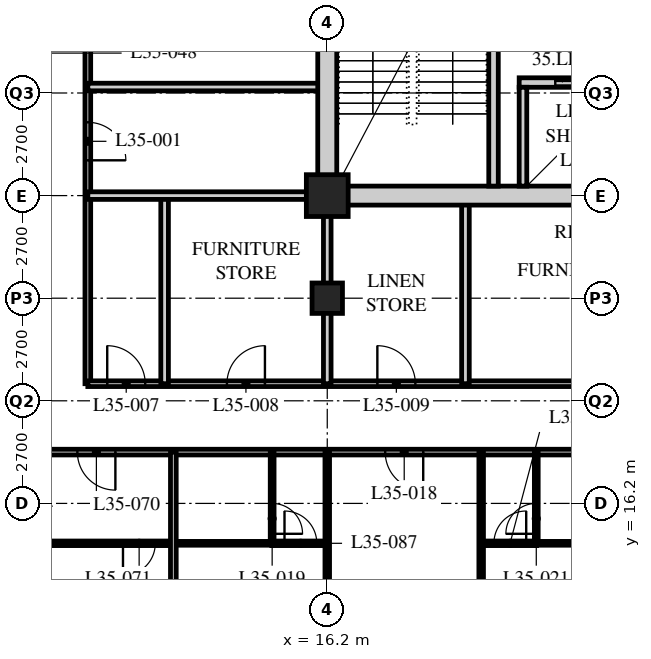
"""IFC4 building model, lengths in metres.
Left out: names, types, materials, properties, quantities, classifications, styles, units other than length and angle.
Written with IfcOpenShell. Run it as: python <this file> out.ifc"""

import sys

from ifc_helpers import new_model, si_unit, direction, frame, frame_2d, origin, origin_2d, place, context, subcontext, project, spatial, rectangle, hollow_rectangle, extrude, element, fill, save


model = new_model("IFC4")
c1 = context("Model", 3, precision=1e-05, world=origin(), true_north=direction((0.0, 1.0)))
c2 = subcontext(c1, "Body", "Model", "MODEL_VIEW")
j1 = project(units=[si_unit("LENGTHUNIT", "METRE"), si_unit("PLANEANGLEUNIT", "RADIAN")], contexts=[c1])
p1 = place(None, origin())
s1 = spatial("IfcSite", under=j1, at=p1, CompositionType="ELEMENT")
p2 = place(p1, origin())
s2 = spatial("IfcBuilding", under=s1, at=p2, CompositionType="ELEMENT")
p3 = place(p2, frame((0.0, 0.0, 137.4)))
s3 = spatial("IfcBuildingStorey", under=s2, at=p3, CompositionType="ELEMENT", Elevation=137.4)
p4 = place(p3, frame((16.2, 21.6, 0.0), z_axis=(0.0, 0.0, 1.0), x_axis=(1.0, 0.0, 0.0)))
e1 = element("IfcColumn", 1, at=p4, inside=s3, PredefinedType="COLUMN", context=c2, shape_type="SweptSolid", body=[
    extrude(hollow_rectangle(XDim=0.8, YDim=0.8, WallThickness=0.08, at=origin_2d()), origin(), (0.0, 0.0, 1.0), 3.4),
])
p5 = place(p3, frame((16.2, 24.3, 0.0), z_axis=(0.0, 0.0, 1.0), x_axis=(1.0, 0.0, 0.0)))
e2 = element("IfcColumn", 2, at=p5, inside=s3, PredefinedType="COLUMN", context=c2, shape_type="SweptSolid", body=[
    extrude(hollow_rectangle(XDim=1.1, YDim=1.1, WallThickness=0.1, at=origin_2d()), origin(), (0.0, 0.0, 1.0), 3.4),
])
p6 = place(p3, frame((8.1, 17.55, 0.0), z_axis=(0.0, 0.0, 1.0), x_axis=(1.0, 0.0, 0.0)))
e3 = element("IfcWall", 3, at=p6, inside=s3, PredefinedType="PARTITIONING", context=c2, shape_type="SweptSolid", body=[
    extrude(rectangle(XDim=36.45, YDim=0.15, at=frame_2d((18.225, 0.0))), origin(), (0.0, 0.0, 1.0), 3.19),
])
p7 = place(p6, frame((9.625, 0.0, 0.0)))
e4 = element("IfcOpeningElement", 4, at=p7, cuts=e3, PredefinedType="OPENING", context=c2, shape_type="SweptSolid", body=[
    extrude(rectangle(XDim=1.0, YDim=2.1, at=frame_2d((0.5, 1.05))), frame((0.0, 0.085, 0.0), z_axis=(0.0, -1.0, 0.0), x_axis=(1.0, 0.0, 0.0)), (0.0, 0.0, 1.0), 0.17),
])
p8 = place(p6, frame((18.1, 0.0, 0.0)))
e5 = element("IfcOpeningElement", 5, at=p8, cuts=e3, PredefinedType="OPENING", context=c2, shape_type="SweptSolid", body=[
    extrude(rectangle(XDim=1.0, YDim=2.1, at=frame_2d((0.5, 1.05))), frame((0.0, 0.085, 0.0), z_axis=(0.0, -1.0, 0.0), x_axis=(1.0, 0.0, 0.0)), (0.0, 0.0, 1.0), 0.17),
])
p9 = place(p6, frame((26.75, 0.0, 0.0)))
e6 = element("IfcOpeningElement", 6, at=p9, cuts=e3, PredefinedType="OPENING", context=c2, shape_type="SweptSolid", body=[
    extrude(rectangle(XDim=1.0, YDim=2.1, at=frame_2d((0.5, 1.05))), frame((0.0, 0.085, 0.0), z_axis=(0.0, -1.0, 0.0), x_axis=(1.0, 0.0, 0.0)), (0.0, 0.0, 1.0), 0.17),
])
p10 = place(p6, frame((30.8, 0.0, 0.0)))
e7 = element("IfcOpeningElement", 7, at=p10, cuts=e3, PredefinedType="OPENING", context=c2, shape_type="SweptSolid", body=[
    extrude(rectangle(XDim=1.0, YDim=2.1, at=frame_2d((0.5, 1.05))), frame((0.0, 0.085, 0.0), z_axis=(0.0, -1.0, 0.0), x_axis=(1.0, 0.0, 0.0)), (0.0, 0.0, 1.0), 0.17),
])
p11 = place(p6, frame((1.525, 0.0, 0.0)))
e8 = element("IfcOpeningElement", 8, at=p11, cuts=e3, PredefinedType="OPENING", context=c2, shape_type="SweptSolid", body=[
    extrude(rectangle(XDim=1.0, YDim=2.1, at=frame_2d((0.5, 1.05))), frame((0.0, 0.085, 0.0), z_axis=(0.0, -1.0, 0.0), x_axis=(1.0, 0.0, 0.0)), (0.0, 0.0, 1.0), 0.17),
])
p12 = place(p6, frame((33.925, 0.0, 0.0)))
e9 = element("IfcOpeningElement", 9, at=p12, cuts=e3, PredefinedType="OPENING", context=c2, shape_type="SweptSolid", body=[
    extrude(rectangle(XDim=1.0, YDim=2.1, at=frame_2d((0.5, 1.05))), frame((0.0, 0.085, 0.0), z_axis=(0.0, -1.0, 0.0), x_axis=(1.0, 0.0, 0.0)), (0.0, 0.0, 1.0), 0.17),
])
p13 = place(p3, frame((9.9, 44.1, 0.0), z_axis=(0.0, 0.0, 1.0), x_axis=(0.0, -1.0, 0.0)))
e10 = element("IfcWall", 10, at=p13, inside=s3, PredefinedType="PARTITIONING", context=c2, shape_type="SweptSolid", body=[
    extrude(rectangle(XDim=24.75, YDim=0.15, at=frame_2d((12.375, 0.0))), origin(), (0.0, 0.0, 1.0), 3.19),
])
p14 = place(p13, frame((17.871, 0.0, 0.0)))
e11 = element("IfcOpeningElement", 11, at=p14, cuts=e10, PredefinedType="OPENING", context=c2, shape_type="SweptSolid", body=[
    extrude(rectangle(XDim=1.0, YDim=2.1, at=frame_2d((0.5, 1.05))), frame((0.0, 0.085, 0.0), z_axis=(0.0, -1.0, 0.0), x_axis=(1.0, 0.0, 0.0)), (0.0, 0.0, 1.0), 0.17),
])
p15 = place(p13, frame((13.821, 0.0, 0.0)))
e12 = element("IfcOpeningElement", 12, at=p15, cuts=e10, PredefinedType="OPENING", context=c2, shape_type="SweptSolid", body=[
    extrude(rectangle(XDim=1.0, YDim=2.1, at=frame_2d((0.5, 1.05))), frame((0.0, 0.085, 0.0), z_axis=(0.0, -1.0, 0.0), x_axis=(1.0, 0.0, 0.0)), (0.0, 0.0, 1.0), 0.17),
])
p16 = place(p13, frame((10.4, 0.0, 0.0)))
e13 = element("IfcOpeningElement", 13, at=p16, cuts=e10, PredefinedType="OPENING", context=c2, shape_type="SweptSolid", body=[
    extrude(rectangle(XDim=1.0, YDim=2.1, at=frame_2d((0.5, 1.05))), frame((0.0, 0.085, 0.0), z_axis=(0.0, -1.0, 0.0), x_axis=(1.0, 0.0, 0.0)), (0.0, 0.0, 1.0), 0.17),
])
p17 = place(p13, frame((6.35, 0.0, 0.0)))
e14 = element("IfcOpeningElement", 14, at=p17, cuts=e10, PredefinedType="OPENING", context=c2, shape_type="SweptSolid", body=[
    extrude(rectangle(XDim=1.0, YDim=2.1, at=frame_2d((0.5, 1.05))), frame((0.0, 0.085, 0.0), z_axis=(0.0, -1.0, 0.0), x_axis=(1.0, 0.0, 0.0)), (0.0, 0.0, 1.0), 0.17),
])
p18 = place(p3, frame((9.9, 19.35, 0.0), z_axis=(0.0, 0.0, 1.0), x_axis=(1.0, 0.0, 0.0)))
e15 = element("IfcWall", 15, at=p18, inside=s3, PredefinedType="PARTITIONING", context=c2, shape_type="SweptSolid", body=[
    extrude(rectangle(XDim=17.24, YDim=0.15, at=frame_2d((8.62, 0.0))), origin(), (0.0, 0.0, 1.0), 3.19),
])
p19 = place(p18, frame((0.51, 0.0, 0.0)))
e16 = element("IfcOpeningElement", 16, at=p19, cuts=e15, PredefinedType="OPENING", context=c2, shape_type="SweptSolid", body=[
    extrude(rectangle(XDim=1.0, YDim=2.1, at=frame_2d((0.5, 1.05))), frame((0.0, 0.085, 0.0), z_axis=(0.0, -1.0, 0.0), x_axis=(1.0, 0.0, 0.0)), (0.0, 0.0, 1.0), 0.17),
])
p20 = place(p18, frame((3.66, 0.0, 0.0)))
e17 = element("IfcOpeningElement", 17, at=p20, cuts=e15, PredefinedType="OPENING", context=c2, shape_type="SweptSolid", body=[
    extrude(rectangle(XDim=1.0, YDim=2.1, at=frame_2d((0.5, 1.05))), frame((0.0, 0.085, 0.0), z_axis=(0.0, -1.0, 0.0), x_axis=(1.0, 0.0, 0.0)), (0.0, 0.0, 1.0), 0.17),
])
p21 = place(p18, frame((7.618, 0.0, 0.0)))
e18 = element("IfcOpeningElement", 18, at=p21, cuts=e15, PredefinedType="OPENING", context=c2, shape_type="SweptSolid", body=[
    extrude(rectangle(XDim=1.0, YDim=2.1, at=frame_2d((0.5, 1.05))), frame((0.0, 0.085, 0.0), z_axis=(0.0, -1.0, 0.0), x_axis=(1.0, 0.0, 0.0)), (0.0, 0.0, 1.0), 0.17),
])
p22 = place(p18, frame((13.093, 0.0, 0.0)))
e19 = element("IfcOpeningElement", 19, at=p22, cuts=e15, PredefinedType="OPENING", context=c2, shape_type="SweptSolid", body=[
    extrude(rectangle(XDim=1.0, YDim=2.1, at=frame_2d((0.5, 1.05))), frame((0.0, 0.085, 0.0), z_axis=(0.0, -1.0, 0.0), x_axis=(1.0, 0.0, 0.0)), (0.0, 0.0, 1.0), 0.17),
])
p23 = place(p3, frame((9.9, 27.157, 0.0), z_axis=(0.0, 0.0, 1.0), x_axis=(1.0, 0.0, 0.0)))
e20 = element("IfcWall", 20, at=p23, inside=s3, PredefinedType="SOLIDWALL", context=c2, shape_type="SweptSolid", body=[
    extrude(rectangle(XDim=6.3, YDim=0.2, at=frame_2d((3.15, 0.0))), origin(), (0.0, 0.0, 1.0), 3.19),
])
p24 = place(p3, frame((16.2, 19.35, 0.0), z_axis=(0.0, 0.0, 1.0), x_axis=(0.0, 1.0, 0.0)))
e21 = element("IfcWall", 21, at=p24, inside=s3, PredefinedType="SOLIDWALL", context=c2, shape_type="SweptSolid", body=[
    extrude(rectangle(XDim=4.95, YDim=0.2, at=frame_2d((2.475, 0.0))), origin(), (0.0, 0.0, 1.0), 2.49),
])
for number, where, z_axis, x_axis in (
    (22, (11.92, 19.35, 0.0), (0.0, 0.0, 1.0), (0.0, 1.0, 0.0)),
    (23, (19.836, 19.35, 0.0), (0.0, 0.0, 1.0), (0.0, 1.0, 0.0)),
):
    element("IfcWall", number, at=place(p3, frame(where, z_axis=z_axis, x_axis=x_axis)), inside=s3, PredefinedType="SOLIDWALL", context=c2, shape_type="SweptSolid", body=[
        extrude(rectangle(XDim=4.95, YDim=0.2, at=frame_2d((2.475, 0.0))), origin(), (0.0, 0.0, 1.0), 3.19),
    ])
p25 = place(p3, frame((9.9, 24.3, 0.0), z_axis=(0.0, 0.0, 1.0), x_axis=(1.0, 0.0, 0.0)))
e24 = element("IfcWall", 24, at=p25, inside=s3, PredefinedType="SOLIDWALL", context=c2, shape_type="SweptSolid", body=[
    extrude(rectangle(XDim=6.3, YDim=0.2, at=frame_2d((3.15, 0.0))), origin(), (0.0, 0.0, 1.0), 3.19),
])
p26 = place(p3, frame((12.15, 15.15, 0.0), z_axis=(0.0, 0.0, 1.0), x_axis=(1.0, 0.0, 0.0)))
e25 = element("IfcWall", 25, at=p26, inside=s3, PredefinedType="PARTITIONING", context=c2, shape_type="SweptSolid", body=[
    extrude(rectangle(XDim=2.6, YDim=0.1, at=frame_2d((1.3, 0.0))), origin(), (0.0, 0.0, 1.0), 3.19),
])
p27 = place(p3, frame((14.75, 17.55, 0.0), z_axis=(0.0, 0.0, 1.0), x_axis=(0.0, -1.0, 0.0)))
e26 = element("IfcWall", 26, at=p27, inside=s3, PredefinedType="PARTITIONING", context=c2, shape_type="SweptSolid", body=[
    extrude(rectangle(XDim=2.4, YDim=0.1, at=frame_2d((1.2, 0.0))), origin(), (0.0, 0.0, 1.0), 3.19),
])
p28 = place(p27, frame((1.35, 0.0, 0.0)))
e27 = element("IfcOpeningElement", 27, at=p28, cuts=e26, PredefinedType="OPENING", context=c2, shape_type="SweptSolid", body=[
    extrude(rectangle(XDim=0.8, YDim=2.1, at=frame_2d((0.4, 1.05))), frame((0.0, 0.06, 0.0), z_axis=(0.0, -1.0, 0.0), x_axis=(1.0, 0.0, 0.0)), (0.0, 0.0, 1.0), 0.12),
])
p29 = place(p3, frame((16.2, 17.55, 0.0), z_axis=(0.0, 0.0, 1.0), x_axis=(0.0, -1.0, 0.0)))
e28 = element("IfcWall", 28, at=p29, inside=s3, PredefinedType="PARTITIONING", context=c2, shape_type="SweptSolid", body=[
    extrude(rectangle(XDim=11.85, YDim=0.12, at=frame_2d((5.925, 0.0))), origin(), (0.0, 0.0, 1.0), 2.578),
])
p30 = place(p29, frame((6.85, 0.0, 0.0)))
e29 = element("IfcOpeningElement", 29, at=p30, cuts=e28, PredefinedType="OPENING", context=c2, shape_type="SweptSolid", body=[
    extrude(rectangle(XDim=0.85, YDim=2.1, at=frame_2d((0.425, 1.05))), frame((0.0, 0.07, 0.0), z_axis=(0.0, -1.0, 0.0), x_axis=(1.0, 0.0, 0.0)), (0.0, 0.0, 1.0), 0.14),
])
p31 = place(p3, frame((21.7, 15.15, 0.0), z_axis=(0.0, 0.0, 1.0), x_axis=(1.0, 0.0, 0.0)))
e30 = element("IfcWall", 30, at=p31, inside=s3, PredefinedType="PARTITIONING", context=c2, shape_type="SweptSolid", body=[
    extrude(rectangle(XDim=2.6, YDim=0.1, at=frame_2d((1.3, 0.0))), origin(), (0.0, 0.0, 1.0), 3.19),
])
p32 = place(p3, frame((21.7, 17.55, 0.0), z_axis=(0.0, 0.0, 1.0), x_axis=(0.0, -1.0, 0.0)))
e31 = element("IfcWall", 31, at=p32, inside=s3, PredefinedType="PARTITIONING", context=c2, shape_type="SweptSolid", body=[
    extrude(rectangle(XDim=2.4, YDim=0.1, at=frame_2d((1.2, 0.0))), origin(), (0.0, 0.0, 1.0), 3.19),
])
p33 = place(p32, frame((1.35, 0.0, 0.0)))
e32 = element("IfcOpeningElement", 32, at=p33, cuts=e31, PredefinedType="OPENING", context=c2, shape_type="SweptSolid", body=[
    extrude(rectangle(XDim=0.8, YDim=2.1, at=frame_2d((0.4, 1.05))), frame((0.0, 0.06, 0.0), z_axis=(0.0, -1.0, 0.0), x_axis=(1.0, 0.0, 0.0)), (0.0, 0.0, 1.0), 0.12),
])
p34 = place(p3, frame((20.25, 17.55, 0.0), z_axis=(0.0, 0.0, 1.0), x_axis=(0.0, -1.0, 0.0)))
e33 = element("IfcWall", 33, at=p34, inside=s3, PredefinedType="PARTITIONING", context=c2, shape_type="SweptSolid", body=[
    extrude(rectangle(XDim=11.85, YDim=0.12, at=frame_2d((5.925, 0.0))), origin(), (0.0, 0.0, 1.0), 3.19),
])
p35 = place(p34, frame((6.85, 0.0, 0.0)))
e34 = element("IfcOpeningElement", 34, at=p35, cuts=e33, PredefinedType="OPENING", context=c2, shape_type="SweptSolid", body=[
    extrude(rectangle(XDim=0.85, YDim=2.1, at=frame_2d((0.425, 1.05))), frame((0.0, 0.07, 0.0), z_axis=(0.0, -1.0, 0.0), x_axis=(1.0, 0.0, 0.0)), (0.0, 0.0, 1.0), 0.14),
])
p36 = place(p3, frame((4.1, 15.15, 0.0), z_axis=(0.0, 0.0, 1.0), x_axis=(1.0, 0.0, 0.0)))
e35 = element("IfcWall", 35, at=p36, inside=s3, PredefinedType="PARTITIONING", context=c2, shape_type="SweptSolid", body=[
    extrude(rectangle(XDim=8.05, YDim=0.12, at=frame_2d((4.025, 0.0))), origin(), (0.0, 0.0, 1.0), 3.19),
])
p37 = place(p36, frame((6.725, 0.0, 0.0)))
e36 = element("IfcOpeningElement", 36, at=p37, cuts=e35, PredefinedType="OPENING", context=c2, shape_type="SweptSolid", body=[
    extrude(rectangle(XDim=0.85, YDim=2.1, at=frame_2d((0.425, 1.05))), frame((0.0, 0.07, 0.0), z_axis=(0.0, -1.0, 0.0), x_axis=(1.0, 0.0, 0.0)), (0.0, 0.0, 1.0), 0.14),
])
p38 = place(p36, frame((2.875, 0.0, 0.0)))
e37 = element("IfcOpeningElement", 37, at=p38, cuts=e35, PredefinedType="OPENING", context=c2, shape_type="SweptSolid", body=[
    extrude(rectangle(XDim=0.85, YDim=2.1, at=frame_2d((0.425, 1.05))), frame((0.0, 0.07, 0.0), z_axis=(0.0, -1.0, 0.0), x_axis=(1.0, 0.0, 0.0)), (0.0, 0.0, 1.0), 0.14),
])
p39 = place(p3, frame((12.15, 17.55, 0.0), z_axis=(0.0, 0.0, 1.0), x_axis=(0.0, -1.0, 0.0)))
e38 = element("IfcWall", 38, at=p39, inside=s3, PredefinedType="PARTITIONING", context=c2, shape_type="SweptSolid", body=[
    extrude(rectangle(XDim=11.85, YDim=0.15, at=frame_2d((5.925, 0.0))), origin(), (0.0, 0.0, 1.0), 3.19),
])
p40 = place(p3, frame((16.2, 15.15, 0.0), z_axis=(0.0, 0.0, 1.0), x_axis=(-1.0, 0.0, 0.0)))
e39 = element("IfcWall", 39, at=p40, inside=s3, PredefinedType="PARTITIONING", context=c2, shape_type="SweptSolid", body=[
    extrude(rectangle(XDim=1.46, YDim=0.12, at=frame_2d((0.73, 0.0))), origin(), (0.0, 0.0, 1.0), 3.19),
])
p41 = place(p40, frame((0.275, 0.0, 0.0)))
e40 = element("IfcOpeningElement", 40, at=p41, cuts=e39, PredefinedType="OPENING", context=c2, shape_type="SweptSolid", body=[
    extrude(rectangle(XDim=0.85, YDim=2.1, at=frame_2d((0.425, 1.05))), frame((0.0, 0.07, 0.0), z_axis=(0.0, -1.0, 0.0), x_axis=(1.0, 0.0, 0.0)), (0.0, 0.0, 1.0), 0.14),
])
p42 = place(p3, frame((21.71, 15.15, 0.0), z_axis=(0.0, 0.0, 1.0), x_axis=(-1.0, 0.0, 0.0)))
e41 = element("IfcWall", 41, at=p42, inside=s3, PredefinedType="PARTITIONING", context=c2, shape_type="SweptSolid", body=[
    extrude(rectangle(XDim=1.46, YDim=0.12, at=frame_2d((0.73, 0.0))), origin(), (0.0, 0.0, 1.0), 3.19),
])
p43 = place(p42, frame((0.275, 0.0, 0.0)))
e42 = element("IfcOpeningElement", 42, at=p43, cuts=e41, PredefinedType="OPENING", context=c2, shape_type="SweptSolid", body=[
    extrude(rectangle(XDim=0.85, YDim=2.1, at=frame_2d((0.425, 1.05))), frame((0.0, 0.07, 0.0), z_axis=(0.0, -1.0, 0.0), x_axis=(1.0, 0.0, 0.0)), (0.0, 0.0, 1.0), 0.14),
])
p44 = place(p3, frame((15.95, 24.3, 0.0), z_axis=(0.0, 0.0, 1.0), x_axis=(1.0, 0.0, 0.0)))
e43 = element("IfcWall", 43, at=p44, inside=s3, PredefinedType="SOLIDWALL", context=c2, shape_type="SweptSolid", body=[
    extrude(rectangle(XDim=24.8, YDim=0.5, at=frame_2d((12.4, 0.0))), origin(), (0.0, 0.0, 1.0), 2.54),
])
p45 = place(p44, frame((11.5, 0.0, 0.0)))
e44 = element("IfcOpeningElement", 44, at=p45, cuts=e43, PredefinedType="OPENING", context=c2, shape_type="SweptSolid", body=[
    extrude(rectangle(XDim=1.8, YDim=2.4, at=frame_2d((0.9, 1.2))), frame((0.0, 0.26, 0.0), z_axis=(0.0, -1.0, 0.0), x_axis=(1.0, 0.0, 0.0)), (0.0, 0.0, 1.0), 0.52),
])
p46 = place(p3, frame((16.2, 24.55, 0.0), z_axis=(0.0, 0.0, 1.0), x_axis=(0.0, 1.0, 0.0)))
e45 = element("IfcWall", 45, at=p46, inside=s3, PredefinedType="SOLIDWALL", context=c2, shape_type="SweptSolid", body=[
    extrude(rectangle(XDim=15.7, YDim=0.5, at=frame_2d((7.85, 0.0))), origin(), (0.0, 0.0, 1.0), 2.578),
])
p47 = place(p3, frame((20.575, 24.55, 0.0), z_axis=(0.0, 0.0, 1.0), x_axis=(0.0, 1.0, 0.0)))
e46 = element("IfcWall", 46, at=p47, inside=s3, PredefinedType="SOLIDWALL", context=c2, shape_type="SweptSolid", body=[
    extrude(rectangle(XDim=7.75, YDim=0.25, at=frame_2d((3.875, 0.0))), origin(), (0.0, 0.0, 1.0), 3.19),
])
p48 = place(p47, frame((6.2, 0.0, 0.0)))
e47 = element("IfcOpeningElement", 47, at=p48, cuts=e46, PredefinedType="OPENING", context=c2, shape_type="SweptSolid", body=[
    extrude(rectangle(XDim=1.2, YDim=2.1, at=frame_2d((0.6, 1.05))), frame((0.0, 0.135, 0.0), z_axis=(0.0, -1.0, 0.0), x_axis=(1.0, 0.0, 0.0)), (0.0, 0.0, 1.0), 0.27),
])
p49 = place(p3, frame((21.25, 27.275, 0.0), z_axis=(0.0, 0.0, 1.0), x_axis=(1.0, 0.0, 0.0)))
e48 = element("IfcWall", 48, at=p49, inside=s3, PredefinedType="SOLIDWALL", context=c2, shape_type="SweptSolid", body=[
    extrude(rectangle(XDim=2.95, YDim=0.25, at=frame_2d((1.475, 0.0))), origin(), (0.0, 0.0, 1.0), 3.19),
])
p50 = place(p49, frame((0.95, 0.0, 0.0)))
e49 = element("IfcOpeningElement", 49, at=p50, cuts=e48, PredefinedType="OPENING", context=c2, shape_type="SweptSolid", body=[
    extrude(rectangle(XDim=1.1, YDim=2.4, at=frame_2d((0.55, 1.2))), frame((0.0, 0.135, 0.0), z_axis=(0.0, -1.0, 0.0), x_axis=(1.0, 0.0, 0.0)), (0.0, 0.0, 1.0), 0.27),
])
p51 = place(p3, frame((21.35, 24.55, 0.0), z_axis=(0.0, 0.0, 1.0), x_axis=(0.0, 1.0, 0.0)))
e50 = element("IfcWall", 50, at=p51, inside=s3, PredefinedType="SOLIDWALL", context=c2, shape_type="SweptSolid", body=[
    extrude(rectangle(XDim=2.6, YDim=0.2, at=frame_2d((1.3, 0.0))), origin(), (0.0, 0.0, 1.0), 3.19),
])
p52 = place(p14, origin())
e51 = element("IfcDoor", 51, at=p52, inside=s3, OperationType="SINGLE_SWING_RIGHT", PredefinedType="DOOR", context=c2, shape_type="SweptSolid", body=[
    extrude(rectangle(XDim=1.0, YDim=2.1, at=frame_2d((0.5, 1.05))), frame((0.0, 0.025, 0.0), z_axis=(0.0, -1.0, 0.0), x_axis=(1.0, 0.0, 0.0)), (0.0, 0.0, 1.0), 0.05),
])
fill(e11, e51)
p53 = place(p19, origin())
e52 = element("IfcDoor", 52, at=p53, inside=s3, OperationType="SINGLE_SWING_LEFT", PredefinedType="DOOR", context=c2, shape_type="SweptSolid", body=[
    extrude(rectangle(XDim=1.0, YDim=2.1, at=frame_2d((0.5, 1.05))), frame((0.0, 0.025, 0.0), z_axis=(0.0, -1.0, 0.0), x_axis=(1.0, 0.0, 0.0)), (0.0, 0.0, 1.0), 0.05),
])
fill(e16, e52)
p54 = place(p20, origin())
e53 = element("IfcDoor", 53, at=p54, inside=s3, OperationType="SINGLE_SWING_RIGHT", PredefinedType="DOOR", context=c2, shape_type="SweptSolid", body=[
    extrude(rectangle(XDim=1.0, YDim=2.1, at=frame_2d((0.5, 1.05))), frame((0.0, 0.025, 0.0), z_axis=(0.0, -1.0, 0.0), x_axis=(1.0, 0.0, 0.0)), (0.0, 0.0, 1.0), 0.05),
])
fill(e17, e53)
p55 = place(p21, origin())
e54 = element("IfcDoor", 54, at=p55, inside=s3, OperationType="SINGLE_SWING_LEFT", PredefinedType="DOOR", context=c2, shape_type="SweptSolid", body=[
    extrude(rectangle(XDim=1.0, YDim=2.1, at=frame_2d((0.5, 1.05))), frame((0.0, 0.025, 0.0), z_axis=(0.0, -1.0, 0.0), x_axis=(1.0, 0.0, 0.0)), (0.0, 0.0, 1.0), 0.05),
])
fill(e18, e54)
p56 = place(p7, origin())
e55 = element("IfcDoor", 55, at=p56, inside=s3, OperationType="SINGLE_SWING_LEFT", PredefinedType="DOOR", context=c2, shape_type="SweptSolid", body=[
    extrude(rectangle(XDim=1.0, YDim=2.1, at=frame_2d((0.5, 1.05))), frame((0.0, 0.025, 0.0), z_axis=(0.0, -1.0, 0.0), x_axis=(1.0, 0.0, 0.0)), (0.0, 0.0, 1.0), 0.05),
])
fill(e4, e55)
p57 = place(p28, origin())
e56 = element("IfcDoor", 56, at=p57, inside=s3, OperationType="SINGLE_SWING_RIGHT", PredefinedType="DOOR", context=c2, shape_type="SweptSolid", body=[
    extrude(rectangle(XDim=0.8, YDim=2.1, at=frame_2d((0.4, 1.05))), frame((0.0, 0.025, 0.0), z_axis=(0.0, -1.0, 0.0), x_axis=(1.0, 0.0, 0.0)), (0.0, 0.0, 1.0), 0.05),
])
fill(e27, e56)
p58 = place(p33, origin())
e57 = element("IfcDoor", 57, at=p58, inside=s3, OperationType="SINGLE_SWING_LEFT", PredefinedType="DOOR", context=c2, shape_type="SweptSolid", body=[
    extrude(rectangle(XDim=0.8, YDim=2.1, at=frame_2d((0.4, 1.05))), frame((0.0, 0.025, 0.0), z_axis=(0.0, -1.0, 0.0), x_axis=(1.0, 0.0, 0.0)), (0.0, 0.0, 1.0), 0.05),
])
fill(e32, e57)
p59 = place(p11, origin())
e58 = element("IfcDoor", 58, at=p59, inside=s3, OperationType="SINGLE_SWING_LEFT", PredefinedType="DOOR", context=c2, shape_type="SweptSolid", body=[
    extrude(rectangle(XDim=1.0, YDim=2.1, at=frame_2d((0.5, 1.05))), frame((0.0, 0.025, 0.0), z_axis=(0.0, -1.0, 0.0), x_axis=(1.0, 0.0, 0.0)), (0.0, 0.0, 1.0), 0.05),
])
fill(e8, e58)
p60 = place(p37, origin())
e59 = element("IfcDoor", 59, at=p60, inside=s3, OperationType="SINGLE_SWING_RIGHT", PredefinedType="DOOR", context=c2, shape_type="SweptSolid", body=[
    extrude(rectangle(XDim=0.85, YDim=2.1, at=frame_2d((0.425, 1.05))), frame((0.0, 0.025, 0.0), z_axis=(0.0, -1.0, 0.0), x_axis=(1.0, 0.0, 0.0)), (0.0, 0.0, 1.0), 0.05),
])
fill(e36, e59)
p61 = place(p41, origin())
e60 = element("IfcDoor", 60, at=p61, inside=s3, OperationType="SINGLE_SWING_LEFT", PredefinedType="DOOR", context=c2, shape_type="SweptSolid", body=[
    extrude(rectangle(XDim=0.85, YDim=2.1, at=frame_2d((0.425, 1.05))), frame((0.0, 0.025, 0.0), z_axis=(0.0, -1.0, 0.0), x_axis=(1.0, 0.0, 0.0)), (0.0, 0.0, 1.0), 0.05),
])
fill(e40, e60)
p62 = place(p43, origin())
e61 = element("IfcDoor", 61, at=p62, inside=s3, OperationType="SINGLE_SWING_RIGHT", PredefinedType="DOOR", context=c2, shape_type="SweptSolid", body=[
    extrude(rectangle(XDim=0.85, YDim=2.1, at=frame_2d((0.425, 1.05))), frame((0.0, 0.025, 0.0), z_axis=(0.0, -1.0, 0.0), x_axis=(1.0, 0.0, 0.0)), (0.0, 0.0, 1.0), 0.05),
])
fill(e42, e61)
p63 = place(p50, origin())
e62 = element("IfcDoor", 62, at=p63, inside=s3, OperationType="DOUBLE_DOOR_SLIDING", PredefinedType="DOOR", context=c2, shape_type="SweptSolid", body=[
    extrude(rectangle(XDim=1.1, YDim=2.4, at=frame_2d((0.55, 1.2))), frame((0.0, 0.025, 0.0), z_axis=(0.0, -1.0, 0.0), x_axis=(1.0, 0.0, 0.0)), (0.0, 0.0, 1.0), 0.05),
])
fill(e49, e62)
save(model, sys.argv[1])
